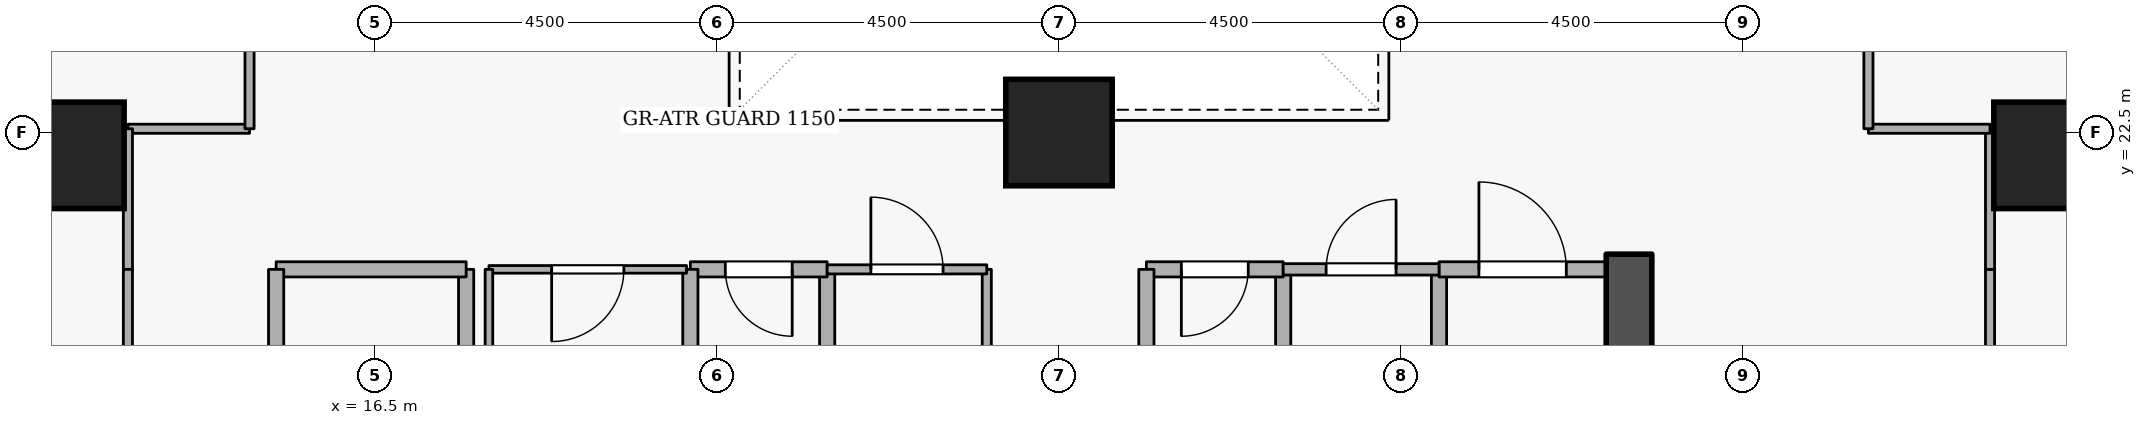
"""IFC4 building model, lengths in metres.
Left out: names, types, materials, properties, quantities, classifications, styles, units other than length and angle.
Written with IfcOpenShell. Run it as: python <this file> out.ifc"""

import sys

from ifc_helpers import new_model, si_unit, direction, frame, frame_2d, origin, origin_2d, place, context, subcontext, project, spatial, rectangle, extrude, element, fill, save


model = new_model("IFC4")
c1 = context("Model", 3, precision=1e-05, world=origin(), true_north=direction((0.0, 1.0)))
c2 = subcontext(c1, "Body", "Model", "MODEL_VIEW")
j1 = project(units=[si_unit("LENGTHUNIT", "METRE"), si_unit("PLANEANGLEUNIT", "RADIAN")], contexts=[c1])
p1 = place(None, origin())
s1 = spatial("IfcSite", under=j1, at=p1, CompositionType="ELEMENT")
p2 = place(p1, origin())
s2 = spatial("IfcBuilding", under=s1, at=p2, CompositionType="ELEMENT")
p3 = place(p2, frame((0.0, 0.0, 27.9)))
s3 = spatial("IfcBuildingStorey", under=s2, at=p3, CompositionType="ELEMENT", Elevation=27.9)
p4 = place(p3, frame((33.0, 15.2, 0.0), z_axis=(0.0, 0.0, 1.0), x_axis=(0.0, 1.0, 0.0)))
e1 = element("IfcWall", 1, at=p4, inside=s3, PredefinedType="SHEAR", context=c2, shape_type="SweptSolid", body=[
    extrude(rectangle(XDim=5.7, YDim=0.6, at=frame_2d((2.85, 0.0))), origin(), (0.0, 0.0, 1.0), 3.6),
])
for number, where, z_axis, x_axis in (
    (2, (12.5, 22.2, 0.0), (0.0, 0.0, 1.0), (1.0, 0.0, 0.0)),
    (3, (38.5, 22.2, 0.0), (0.0, 0.0, 1.0), (1.0, 0.0, 0.0)),
    (4, (25.5, 22.5, 0.0), (0.0, 0.0, 1.0), (1.0, 0.0, 0.0)),
):
    element("IfcColumn", number, at=place(p3, frame(where, z_axis=z_axis, x_axis=x_axis)), inside=s3, PredefinedType="COLUMN", context=c2, shape_type="SweptSolid", body=[
        extrude(rectangle(XDim=1.4, YDim=1.4, at=origin_2d()), origin(), (0.0, 0.0, 1.0), 3.6),
    ])
p5 = place(p3, frame((17.7, 18.4, 0.0), z_axis=(0.0, 0.0, 1.0), x_axis=(0.0, 1.0, 0.0)))
e5 = element("IfcWall", 5, at=p5, inside=s3, PredefinedType="STANDARD", context=c2, shape_type="SweptSolid", body=[
    extrude(rectangle(XDim=2.3, YDim=0.2, at=frame_2d((1.15, 0.0))), origin(), (0.0, 0.0, 1.0), 2.545),
])
p6 = place(p3, frame((17.7, 20.7, 0.0), z_axis=(0.0, 0.0, 1.0), x_axis=(-1.0, 0.0, 0.0)))
e6 = element("IfcWall", 6, at=p6, inside=s3, PredefinedType="STANDARD", context=c2, shape_type="SweptSolid", body=[
    extrude(rectangle(XDim=2.5, YDim=0.2, at=frame_2d((1.25, 0.0))), origin(), (0.0, 0.0, 1.0), 3.34),
])
p7 = place(p3, frame((15.2, 20.7, 0.0), z_axis=(0.0, 0.0, 1.0), x_axis=(0.0, -1.0, 0.0)))
e7 = element("IfcWall", 7, at=p7, inside=s3, PredefinedType="STANDARD", context=c2, shape_type="SweptSolid", body=[
    extrude(rectangle(XDim=5.7, YDim=0.2, at=frame_2d((2.85, 0.0))), origin(), (0.0, 0.0, 1.0), 3.34),
])
p8 = place(p7, frame((2.275, 0.0, 0.0)))
e8 = element("IfcOpeningElement", 8, at=p8, cuts=e7, PredefinedType="OPENING", context=c2, shape_type="SweptSolid", body=[
    extrude(rectangle(XDim=1.15, YDim=2.1, at=frame_2d((0.575, 1.05))), frame((0.0, 0.11, 0.0), z_axis=(0.0, -1.0, 0.0), x_axis=(1.0, 0.0, 0.0)), (0.0, 0.0, 1.0), 0.22),
])
p9 = place(p3, frame((28.45, 18.65, 0.0), z_axis=(0.0, 0.0, 1.0), x_axis=(0.0, 1.0, 0.0)))
e9 = element("IfcWall", 9, at=p9, inside=s3, PredefinedType="STANDARD", context=c2, shape_type="SweptSolid", body=[
    extrude(rectangle(XDim=2.05, YDim=0.2, at=frame_2d((1.025, 0.0))), origin(), (0.0, 0.0, 1.0), 3.34),
])
p10 = place(p3, frame((28.45, 20.7, 0.0), z_axis=(0.0, 0.0, 1.0), x_axis=(-1.0, 0.0, 0.0)))
e10 = element("IfcWall", 10, at=p10, inside=s3, PredefinedType="STANDARD", context=c2, shape_type="SweptSolid", body=[
    extrude(rectangle(XDim=1.8, YDim=0.2, at=frame_2d((0.9, 0.0))), origin(), (0.0, 0.0, 1.0), 3.34),
])
p11 = place(p10, frame((0.46, 0.0, 0.0)))
e11 = element("IfcOpeningElement", 11, at=p11, cuts=e10, PredefinedType="OPENING", context=c2, shape_type="SweptSolid", body=[
    extrude(rectangle(XDim=0.88, YDim=2.04, at=frame_2d((0.44, 1.02))), frame((0.0, 0.11, 0.0), z_axis=(0.0, -1.0, 0.0), x_axis=(1.0, 0.0, 0.0)), (0.0, 0.0, 1.0), 0.22),
])
for number, where, z_axis, x_axis in (
    (12, (26.65, 20.7, 0.0), (0.0, 0.0, 1.0), (0.0, -1.0, 0.0)),
    (13, (22.45, 18.65, 0.0), (0.0, 0.0, 1.0), (0.0, 1.0, 0.0)),
):
    element("IfcWall", number, at=place(p3, frame(where, z_axis=z_axis, x_axis=x_axis)), inside=s3, PredefinedType="STANDARD", context=c2, shape_type="SweptSolid", body=[
        extrude(rectangle(XDim=2.05, YDim=0.2, at=frame_2d((1.025, 0.0))), origin(), (0.0, 0.0, 1.0), 3.34),
    ])
p12 = place(p3, frame((22.45, 20.7, 0.0), z_axis=(0.0, 0.0, 1.0), x_axis=(-1.0, 0.0, 0.0)))
e14 = element("IfcWall", 14, at=p12, inside=s3, PredefinedType="STANDARD", context=c2, shape_type="SweptSolid", body=[
    extrude(rectangle(XDim=1.8, YDim=0.2, at=frame_2d((0.9, 0.0))), origin(), (0.0, 0.0, 1.0), 3.34),
])
p13 = place(p12, frame((0.46, 0.0, 0.0)))
e15 = element("IfcOpeningElement", 15, at=p13, cuts=e14, PredefinedType="OPENING", context=c2, shape_type="SweptSolid", body=[
    extrude(rectangle(XDim=0.88, YDim=2.04, at=frame_2d((0.44, 1.02))), frame((0.0, 0.11, 0.0), z_axis=(0.0, -1.0, 0.0), x_axis=(1.0, 0.0, 0.0)), (0.0, 0.0, 1.0), 0.22),
])
for number, where, z_axis, x_axis in (
    (16, (20.65, 20.7, 0.0), (0.0, 0.0, 1.0), (0.0, -1.0, 0.0)),
    (17, (30.5, 18.65, 0.0), (0.0, 0.0, 1.0), (0.0, 1.0, 0.0)),
):
    element("IfcWall", number, at=place(p3, frame(where, z_axis=z_axis, x_axis=x_axis)), inside=s3, PredefinedType="STANDARD", context=c2, shape_type="SweptSolid", body=[
        extrude(rectangle(XDim=2.05, YDim=0.2, at=frame_2d((1.025, 0.0))), origin(), (0.0, 0.0, 1.0), 3.34),
    ])
p14 = place(p3, frame((30.5, 20.7, 0.0), z_axis=(0.0, 0.0, 1.0), x_axis=(1.0, 0.0, 0.0)))
e18 = element("IfcWall", 18, at=p14, inside=s3, PredefinedType="STANDARD", context=c2, shape_type="SweptSolid", body=[
    extrude(rectangle(XDim=2.2, YDim=0.2, at=frame_2d((1.1, 0.0))), origin(), (0.0, 0.0, 1.0), 3.34),
])
p15 = place(p14, frame((0.525, 0.0, 0.0)))
e19 = element("IfcOpeningElement", 19, at=p15, cuts=e18, PredefinedType="OPENING", context=c2, shape_type="SweptSolid", body=[
    extrude(rectangle(XDim=1.15, YDim=2.1, at=frame_2d((0.575, 1.05))), frame((0.0, 0.11, 0.0), z_axis=(0.0, -1.0, 0.0), x_axis=(1.0, 0.0, 0.0)), (0.0, 0.0, 1.0), 0.22),
])
p16 = place(p3, frame((20.6, 20.7, 0.0), z_axis=(0.0, 0.0, 1.0), x_axis=(-1.0, 0.0, 0.0)))
e20 = element("IfcWall", 20, at=p16, inside=s3, PredefinedType="PARTITIONING", context=c2, shape_type="SweptSolid", body=[
    extrude(rectangle(XDim=2.6, YDim=0.1, at=frame_2d((1.3, 0.0))), origin(), (0.0, 0.0, 1.0), 3.34),
])
p17 = place(p16, frame((0.825, 0.0, 0.0)))
e21 = element("IfcOpeningElement", 21, at=p17, cuts=e20, PredefinedType="OPENING", context=c2, shape_type="SweptSolid", body=[
    extrude(rectangle(XDim=0.95, YDim=2.1, at=frame_2d((0.475, 1.05))), frame((0.0, 0.06, 0.0), z_axis=(0.0, -1.0, 0.0), x_axis=(1.0, 0.0, 0.0)), (0.0, 0.0, 1.0), 0.12),
])
p18 = place(p3, frame((18.0, 20.7, 0.0), z_axis=(0.0, 0.0, 1.0), x_axis=(0.0, -1.0, 0.0)))
e22 = element("IfcWall", 22, at=p18, inside=s3, PredefinedType="PARTITIONING", context=c2, shape_type="SweptSolid", body=[
    extrude(rectangle(XDim=2.05, YDim=0.1, at=frame_2d((1.025, 0.0))), origin(), (0.0, 0.0, 1.0), 2.545),
])
p19 = place(p3, frame((24.55, 20.7, 0.0), z_axis=(0.0, 0.0, 1.0), x_axis=(0.0, -1.0, 0.0)))
e23 = element("IfcWall", 23, at=p19, inside=s3, PredefinedType="PARTITIONING", context=c2, shape_type="SweptSolid", body=[
    extrude(rectangle(XDim=2.05, YDim=0.12, at=frame_2d((1.025, 0.0))), origin(), (0.0, 0.0, 1.0), 3.34),
])
p20 = place(p3, frame((22.45, 20.7, 0.0), z_axis=(0.0, 0.0, 1.0), x_axis=(1.0, 0.0, 0.0)))
e24 = element("IfcWall", 24, at=p20, inside=s3, PredefinedType="PARTITIONING", context=c2, shape_type="SweptSolid", body=[
    extrude(rectangle(XDim=2.1, YDim=0.12, at=frame_2d((1.05, 0.0))), origin(), (0.0, 0.0, 1.0), 3.34),
])
p21 = place(p20, frame((0.575, 0.0, 0.0)))
e25 = element("IfcOpeningElement", 25, at=p21, cuts=e24, PredefinedType="OPENING", context=c2, shape_type="SweptSolid", body=[
    extrude(rectangle(XDim=0.95, YDim=2.1, at=frame_2d((0.475, 1.05))), frame((0.0, 0.07, 0.0), z_axis=(0.0, -1.0, 0.0), x_axis=(1.0, 0.0, 0.0)), (0.0, 0.0, 1.0), 0.14),
])
p22 = place(p3, frame((28.45, 20.7, 0.0), z_axis=(0.0, 0.0, 1.0), x_axis=(1.0, 0.0, 0.0)))
e26 = element("IfcWall", 26, at=p22, inside=s3, PredefinedType="PARTITIONING", context=c2, shape_type="SweptSolid", body=[
    extrude(rectangle(XDim=2.05, YDim=0.15, at=frame_2d((1.025, 0.0))), origin(), (0.0, 0.0, 1.0), 3.34),
])
p23 = place(p22, frame((0.565, 0.0, 0.0)))
e27 = element("IfcOpeningElement", 27, at=p23, cuts=e26, PredefinedType="OPENING", context=c2, shape_type="SweptSolid", body=[
    extrude(rectangle(XDim=0.92, YDim=2.08, at=frame_2d((0.46, 1.04))), frame((0.0, 0.085, 0.0), z_axis=(0.0, -1.0, 0.0), x_axis=(1.0, 0.0, 0.0)), (0.0, 0.0, 1.0), 0.17),
])
p24 = place(p3, frame((14.85, 22.55, 0.0), z_axis=(0.0, 0.0, 1.0), x_axis=(-1.0, 0.0, 0.0)))
e28 = element("IfcWall", 28, at=p24, inside=s3, PredefinedType="PARTITIONING", context=c2, shape_type="SweptSolid", body=[
    extrude(rectangle(XDim=1.6, YDim=0.12, at=frame_2d((0.8, 0.0))), origin(), (0.0, 0.0, 1.0), 3.34),
])
p25 = place(p3, frame((13.25, 22.55, 0.0), z_axis=(0.0, 0.0, 1.0), x_axis=(0.0, -1.0, 0.0)))
e29 = element("IfcWall", 29, at=p25, inside=s3, PredefinedType="PARTITIONING", context=c2, shape_type="SweptSolid", body=[
    extrude(rectangle(XDim=1.85, YDim=0.12, at=frame_2d((0.925, 0.0))), origin(), (0.0, 0.0, 1.0), 3.34),
])
p26 = place(p3, frame((13.25, 20.7, 0.0), z_axis=(0.0, 0.0, 1.0), x_axis=(0.0, -1.0, 0.0)))
e30 = element("IfcWall", 30, at=p26, inside=s3, PredefinedType="PARTITIONING", context=c2, shape_type="SweptSolid", body=[
    extrude(rectangle(XDim=9.35, YDim=0.12, at=frame_2d((4.675, 0.0))), origin(), (0.0, 0.0, 1.0), 3.34),
])
p27 = place(p26, frame((4.15, 0.0, 0.0)))
e31 = element("IfcOpeningElement", 31, at=p27, cuts=e30, PredefinedType="OPENING", context=c2, shape_type="SweptSolid", body=[
    extrude(rectangle(XDim=1.05, YDim=2.1, at=frame_2d((0.525, 1.05))), frame((0.0, 0.07, 0.0), z_axis=(0.0, -1.0, 0.0), x_axis=(1.0, 0.0, 0.0)), (0.0, 0.0, 1.0), 0.14),
])
p28 = place(p3, frame((14.85, 27.0, 0.0), z_axis=(0.0, 0.0, 1.0), x_axis=(0.0, -1.0, 0.0)))
e32 = element("IfcWall", 32, at=p28, inside=s3, PredefinedType="PARTITIONING", context=c2, shape_type="SweptSolid", body=[
    extrude(rectangle(XDim=4.45, YDim=0.12, at=frame_2d((2.225, 0.0))), origin(), (0.0, 0.0, 1.0), 3.34),
])
p29 = place(p3, frame((37.75, 17.55, 0.0), z_axis=(0.0, 0.0, 1.0), x_axis=(0.0, 1.0, 0.0)))
e33 = element("IfcWall", 33, at=p29, inside=s3, PredefinedType="PARTITIONING", context=c2, shape_type="SweptSolid", body=[
    extrude(rectangle(XDim=3.15, YDim=0.12, at=frame_2d((1.575, 0.0))), origin(), (0.0, 0.0, 1.0), 3.34),
])
p30 = place(p3, frame((37.75, 20.7, 0.0), z_axis=(0.0, 0.0, 1.0), x_axis=(0.0, 1.0, 0.0)))
e34 = element("IfcWall", 34, at=p30, inside=s3, PredefinedType="PARTITIONING", context=c2, shape_type="SweptSolid", body=[
    extrude(rectangle(XDim=1.85, YDim=0.12, at=frame_2d((0.925, 0.0))), origin(), (0.0, 0.0, 1.0), 3.34),
])
p31 = place(p3, frame((37.75, 22.55, 0.0), z_axis=(0.0, 0.0, 1.0), x_axis=(-1.0, 0.0, 0.0)))
e35 = element("IfcWall", 35, at=p31, inside=s3, PredefinedType="PARTITIONING", context=c2, shape_type="SweptSolid", body=[
    extrude(rectangle(XDim=1.6, YDim=0.12, at=frame_2d((0.8, 0.0))), origin(), (0.0, 0.0, 1.0), 3.34),
])
p32 = place(p3, frame((36.15, 22.55, 0.0), z_axis=(0.0, 0.0, 1.0), x_axis=(0.0, 1.0, 0.0)))
e36 = element("IfcWall", 36, at=p32, inside=s3, PredefinedType="PARTITIONING", context=c2, shape_type="SweptSolid", body=[
    extrude(rectangle(XDim=4.45, YDim=0.12, at=frame_2d((2.225, 0.0))), origin(), (0.0, 0.0, 1.0), 3.34),
])
p33 = place(p32, frame((1.7, 0.0, 0.0)))
e37 = element("IfcOpeningElement", 37, at=p33, cuts=e36, PredefinedType="OPENING", context=c2, shape_type="SweptSolid", body=[
    extrude(rectangle(XDim=1.05, YDim=2.1, at=frame_2d((0.525, 1.05))), frame((0.0, 0.07, 0.0), z_axis=(0.0, -1.0, 0.0), x_axis=(1.0, 0.0, 0.0)), (0.0, 0.0, 1.0), 0.14),
])
p34 = place(p11, origin())
e38 = element("IfcDoor", 38, at=p34, inside=s3, OperationType="SINGLE_SWING_RIGHT", PredefinedType="DOOR", context=c2, shape_type="SweptSolid", body=[
    extrude(rectangle(XDim=0.88, YDim=2.04, at=frame_2d((0.44, 1.02))), frame((0.0, 0.025, 0.0), z_axis=(0.0, -1.0, 0.0), x_axis=(1.0, 0.0, 0.0)), (0.0, 0.0, 1.0), 0.05),
])
fill(e11, e38)
p35 = place(p13, origin())
e39 = element("IfcDoor", 39, at=p35, inside=s3, OperationType="SINGLE_SWING_LEFT", PredefinedType="DOOR", context=c2, shape_type="SweptSolid", body=[
    extrude(rectangle(XDim=0.88, YDim=2.04, at=frame_2d((0.44, 1.02))), frame((0.0, 0.025, 0.0), z_axis=(0.0, -1.0, 0.0), x_axis=(1.0, 0.0, 0.0)), (0.0, 0.0, 1.0), 0.05),
])
fill(e15, e39)
p36 = place(p17, origin())
e40 = element("IfcDoor", 40, at=p36, inside=s3, OperationType="SINGLE_SWING_RIGHT", PredefinedType="DOOR", context=c2, shape_type="SweptSolid", body=[
    extrude(rectangle(XDim=0.95, YDim=2.1, at=frame_2d((0.475, 1.05))), frame((0.0, 0.025, 0.0), z_axis=(0.0, -1.0, 0.0), x_axis=(1.0, 0.0, 0.0)), (0.0, 0.0, 1.0), 0.05),
])
fill(e21, e40)
p37 = place(p21, origin())
e41 = element("IfcDoor", 41, at=p37, inside=s3, OperationType="SINGLE_SWING_LEFT", PredefinedType="DOOR", context=c2, shape_type="SweptSolid", body=[
    extrude(rectangle(XDim=0.95, YDim=2.1, at=frame_2d((0.475, 1.05))), frame((0.0, 0.025, 0.0), z_axis=(0.0, -1.0, 0.0), x_axis=(1.0, 0.0, 0.0)), (0.0, 0.0, 1.0), 0.05),
])
fill(e25, e41)
p38 = place(p23, origin())
e42 = element("IfcDoor", 42, at=p38, inside=s3, OperationType="SINGLE_SWING_RIGHT", PredefinedType="DOOR", context=c2, shape_type="SweptSolid", body=[
    extrude(rectangle(XDim=0.92, YDim=2.08, at=frame_2d((0.46, 1.04))), frame((0.0, 0.025, 0.0), z_axis=(0.0, -1.0, 0.0), x_axis=(1.0, 0.0, 0.0)), (0.0, 0.0, 1.0), 0.05),
])
fill(e27, e42)
p39 = place(p15, origin())
e43 = element("IfcDoor", 43, at=p39, inside=s3, OperationType="SINGLE_SWING_LEFT", PredefinedType="DOOR", context=c2, shape_type="SweptSolid", body=[
    extrude(rectangle(XDim=1.15, YDim=2.1, at=frame_2d((0.575, 1.05))), frame((0.0, 0.025, 0.0), z_axis=(0.0, -1.0, 0.0), x_axis=(1.0, 0.0, 0.0)), (0.0, 0.0, 1.0), 0.05),
])
fill(e19, e43)
save(model, sys.argv[1])
